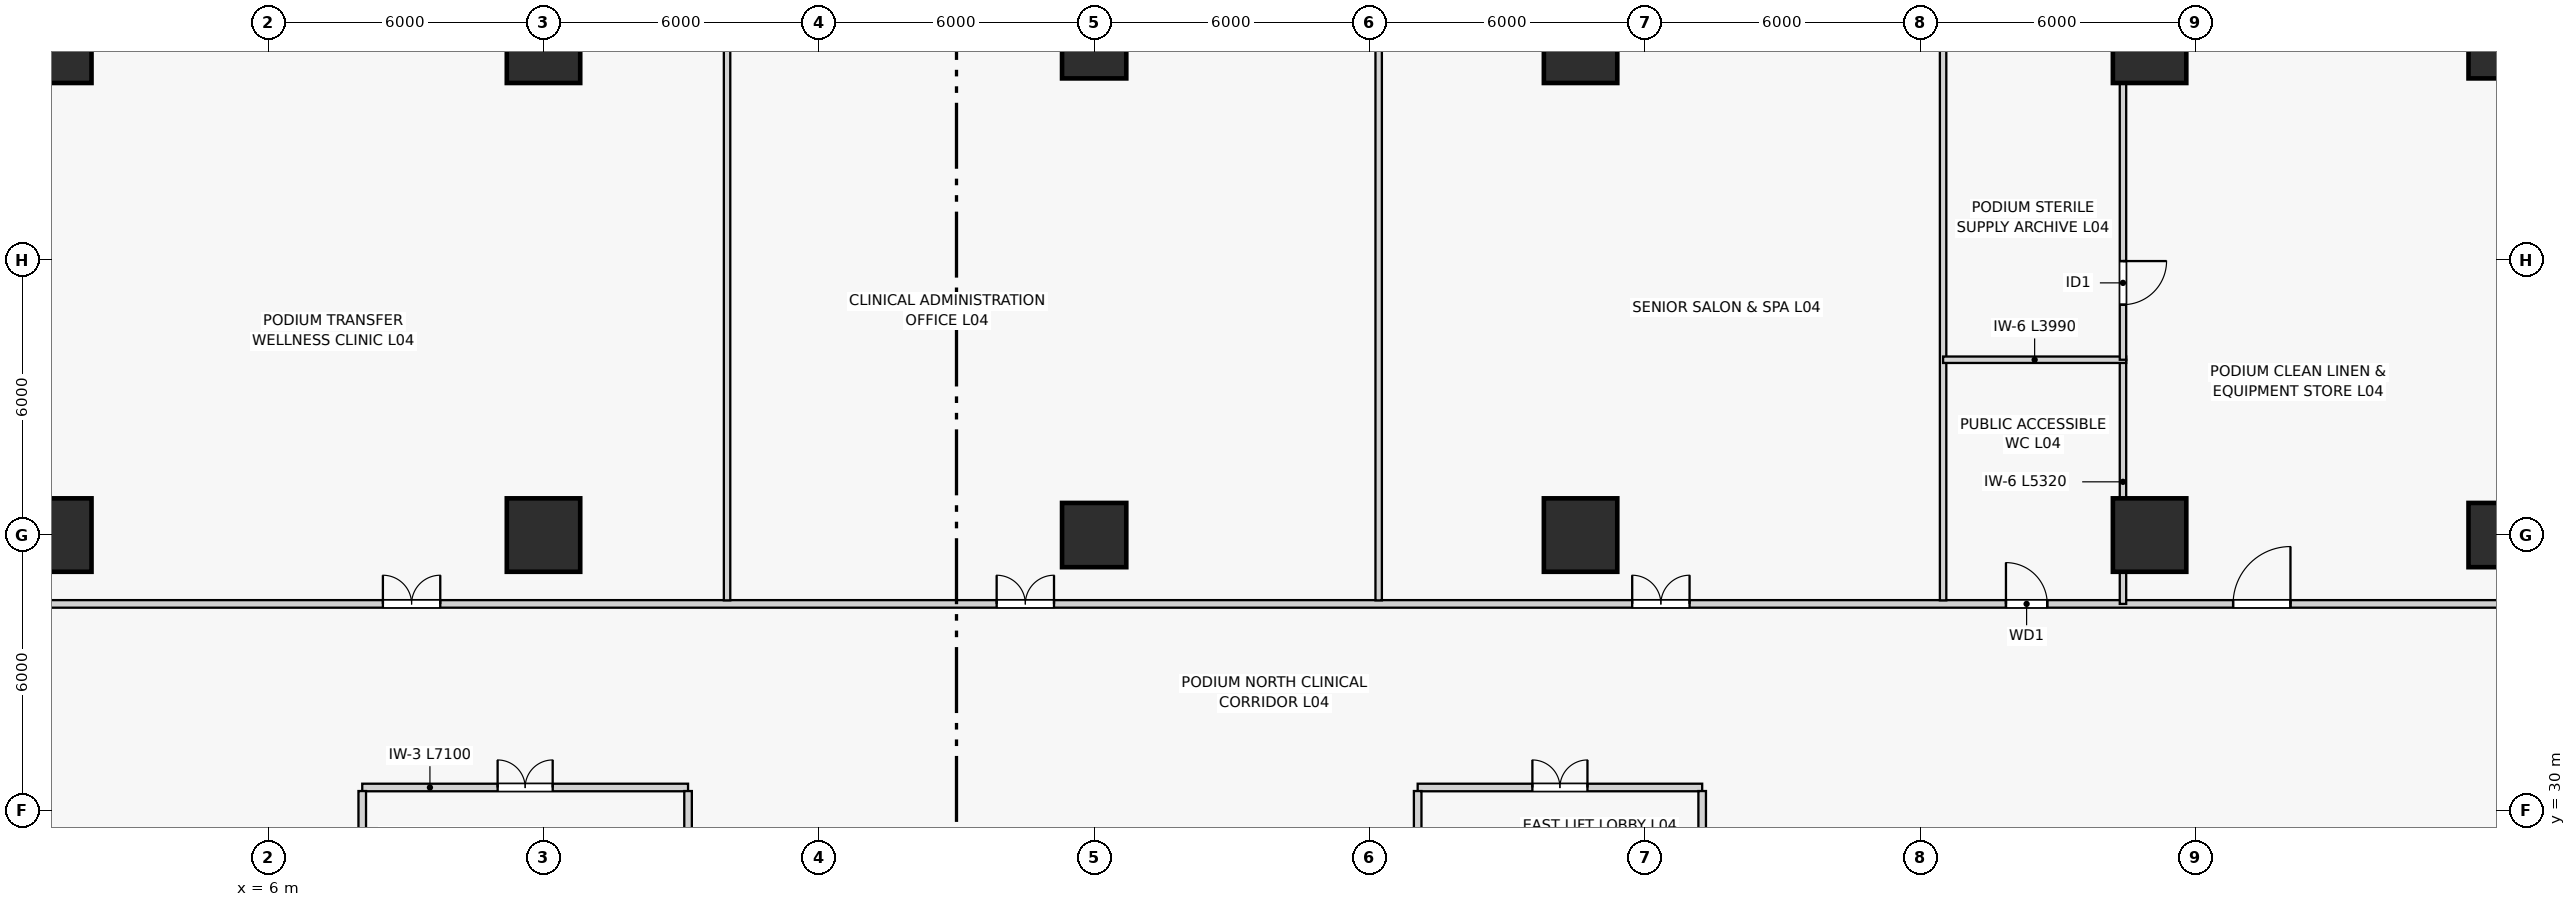
"""IFC4 building model, lengths in metres.
Left out: names, types, materials, properties, quantities, classifications, styles, units other than length and angle.
Written with IfcOpenShell. Run it as: python <this file> out.ifc"""

import sys

from ifc_helpers import new_model, si_unit, direction, frame, frame_2d, origin, origin_2d, place, context, subcontext, project, spatial, rectangle, extrude, source, transform, mapped, element, fill, save


model = new_model("IFC4")
c1 = context("Model", 3, precision=1e-05, world=origin(), true_north=direction((0.0, 1.0)))
c2 = subcontext(c1, "Body", "Model", "MODEL_VIEW")
j1 = project(units=[si_unit("LENGTHUNIT", "METRE"), si_unit("PLANEANGLEUNIT", "RADIAN")], contexts=[c1])
p1 = place(None, origin())
s1 = spatial("IfcSite", under=j1, at=p1, CompositionType="ELEMENT")
p2 = place(p1, origin())
s2 = spatial("IfcBuilding", under=s1, at=p2, CompositionType="ELEMENT")
p3 = place(p2, frame((0.0, 0.0, 18.0)))
s3 = spatial("IfcBuildingStorey", under=s2, at=p3, CompositionType="ELEMENT", Elevation=18.0)
m1 = source(origin(), c2, "Body", "SweptSolid", [
    extrude(rectangle(XDim=1.6, YDim=1.6, at=origin_2d()), origin(), (0.0, 0.0, 1.0), 4.5),
])
for number, where, z_axis, x_axis in (
    (1, (1.35, 36.0, 0.0), (0.0, 0.0, 1.0), (1.0, 0.0, 0.0)),
    (2, (1.35, 46.65, 0.0), (0.0, 0.0, 1.0), (1.0, 0.0, 0.0)),
    (3, (12.0, 36.0, 0.0), (0.0, 0.0, 1.0), (1.0, 0.0, 0.0)),
    (4, (12.0, 46.65, 0.0), (0.0, 0.0, 1.0), (1.0, 0.0, 0.0)),
):
    element("IfcColumn", number, at=place(p3, frame(where, z_axis=z_axis, x_axis=x_axis)), inside=s3, PredefinedType="COLUMN", context=c2, shape_type="MappedRepresentation", body=[
        mapped(m1, transform((0.0, 0.0, 0.0), scale=1.0)),
    ])
m2 = source(origin(), c2, "Body", "SweptSolid", [
    extrude(rectangle(XDim=1.4, YDim=1.4, at=origin_2d()), origin(), (0.0, 0.0, 1.0), 4.5),
])
for number, where, z_axis, x_axis in (
    (5, (24.0, 36.0, 0.0), (0.0, 0.0, 1.0), (1.0, 0.0, 0.0)),
    (6, (24.0, 46.65, 0.0), (0.0, 0.0, 1.0), (1.0, 0.0, 0.0)),
):
    element("IfcColumn", number, at=place(p3, frame(where, z_axis=z_axis, x_axis=x_axis)), inside=s3, PredefinedType="COLUMN", context=c2, shape_type="MappedRepresentation", body=[
        mapped(m2, transform((0.0, 0.0, 0.0), scale=1.0)),
    ])
for number, where, z_axis, x_axis in (
    (7, (34.6, 36.0, 0.0), (0.0, 0.0, 1.0), (1.0, 0.0, 0.0)),
    (8, (34.6, 46.65, 0.0), (0.0, 0.0, 1.0), (1.0, 0.0, 0.0)),
    (9, (47.0, 36.0, 0.0), (0.0, 0.0, 1.0), (1.0, 0.0, 0.0)),
    (10, (47.0, 46.65, 0.0), (0.0, 0.0, 1.0), (1.0, 0.0, 0.0)),
):
    element("IfcColumn", number, at=place(p3, frame(where, z_axis=z_axis, x_axis=x_axis)), inside=s3, PredefinedType="COLUMN", context=c2, shape_type="MappedRepresentation", body=[
        mapped(m1, transform((0.0, 0.0, 0.0), scale=1.0)),
    ])
for number, where, z_axis, x_axis in (
    (11, (54.65, 36.0, 0.0), (0.0, 0.0, 1.0), (1.0, 0.0, 0.0)),
    (12, (54.65, 46.65, 0.0), (0.0, 0.0, 1.0), (1.0, 0.0, 0.0)),
):
    element("IfcColumn", number, at=place(p3, frame(where, z_axis=z_axis, x_axis=x_axis)), inside=s3, PredefinedType="COLUMN", context=c2, shape_type="MappedRepresentation", body=[
        mapped(m2, transform((0.0, 0.0, 0.0), scale=1.0)),
    ])
p4 = place(p3, frame((8.05, 30.5, 0.0), z_axis=(0.0, 0.0, 1.0), x_axis=(1.0, 0.0, 0.0)))
e13 = element("IfcWall", 13, at=p4, inside=s3, PredefinedType="PARTITIONING", context=c2, shape_type="SweptSolid", body=[
    extrude(rectangle(XDim=7.1, YDim=0.165, at=frame_2d((3.55, 0.0))), origin(), (0.0, 0.0, 1.0), 3.85),
])
p5 = place(p4, frame((2.95, 0.0, 0.0)))
e14 = element("IfcOpeningElement", 14, at=p5, cuts=e13, PredefinedType="OPENING", context=c2, shape_type="SweptSolid", body=[
    extrude(rectangle(XDim=1.2, YDim=2.2, at=frame_2d((0.6, 1.1))), frame((0.0, 0.093, 0.0), z_axis=(0.0, -1.0, 0.0), x_axis=(1.0, 0.0, 0.0)), (0.0, 0.0, 1.0), 0.185),
])
for number, where, z_axis, x_axis in (
    (15, (8.05, 27.62, 0.0), (0.0, 0.0, 1.0), (0.0, 1.0, 0.0)),
    (16, (15.15, 27.62, 0.0), (0.0, 0.0, 1.0), (0.0, 1.0, 0.0)),
):
    element("IfcWall", number, at=place(p3, frame(where, z_axis=z_axis, x_axis=x_axis)), inside=s3, PredefinedType="PARTITIONING", context=c2, shape_type="SweptSolid", body=[
        extrude(rectangle(XDim=2.802, YDim=0.165, at=frame_2d((1.401, 0.0))), origin(), (0.0, 0.0, 1.0), 3.85),
    ])
p6 = place(p3, frame((31.05, 30.5, 0.0), z_axis=(0.0, 0.0, 1.0), x_axis=(1.0, 0.0, 0.0)))
e17 = element("IfcWall", 17, at=p6, inside=s3, PredefinedType="PARTITIONING", context=c2, shape_type="SweptSolid", body=[
    extrude(rectangle(XDim=6.2, YDim=0.165, at=frame_2d((3.1, 0.0))), origin(), (0.0, 0.0, 1.0), 3.85),
])
p7 = place(p6, frame((2.5, 0.0, 0.0)))
e18 = element("IfcOpeningElement", 18, at=p7, cuts=e17, PredefinedType="OPENING", context=c2, shape_type="SweptSolid", body=[
    extrude(rectangle(XDim=1.2, YDim=2.2, at=frame_2d((0.6, 1.1))), frame((0.0, 0.093, 0.0), z_axis=(0.0, -1.0, 0.0), x_axis=(1.0, 0.0, 0.0)), (0.0, 0.0, 1.0), 0.185),
])
p8 = place(p3, frame((31.05, 27.62, 0.0), z_axis=(0.0, 0.0, 1.0), x_axis=(0.0, 1.0, 0.0)))
e19 = element("IfcWall", 19, at=p8, inside=s3, PredefinedType="PARTITIONING", context=c2, shape_type="SweptSolid", body=[
    extrude(rectangle(XDim=2.802, YDim=0.165, at=frame_2d((1.401, 0.0))), origin(), (0.0, 0.0, 1.0), 2.52),
])
p9 = place(p3, frame((37.25, 27.62, 0.0), z_axis=(0.0, 0.0, 1.0), x_axis=(0.0, 1.0, 0.0)))
e20 = element("IfcWall", 20, at=p9, inside=s3, PredefinedType="PARTITIONING", context=c2, shape_type="SweptSolid", body=[
    extrude(rectangle(XDim=2.802, YDim=0.165, at=frame_2d((1.401, 0.0))), origin(), (0.0, 0.0, 1.0), 3.85),
])
p10 = place(p3, frame((0.185, 34.5, 0.0), z_axis=(0.0, 0.0, 1.0), x_axis=(1.0, 0.0, 0.0)))
e21 = element("IfcWall", 21, at=p10, inside=s3, PredefinedType="PARTITIONING", context=c2, shape_type="SweptSolid", body=[
    extrude(rectangle(XDim=55.63, YDim=0.165, at=frame_2d((27.815, 0.0))), origin(), (0.0, 0.0, 1.0), 3.85),
])
p11 = place(p10, frame((8.315, 0.0, 0.0)))
e22 = element("IfcOpeningElement", 22, at=p11, cuts=e21, PredefinedType="OPENING", context=c2, shape_type="SweptSolid", body=[
    extrude(rectangle(XDim=1.25, YDim=2.2, at=frame_2d((0.625, 1.1))), frame((0.0, 0.093, 0.0), z_axis=(0.0, -1.0, 0.0), x_axis=(1.0, 0.0, 0.0)), (0.0, 0.0, 1.0), 0.185),
])
p12 = place(p10, frame((21.69, 0.0, 0.0)))
e23 = element("IfcOpeningElement", 23, at=p12, cuts=e21, PredefinedType="OPENING", context=c2, shape_type="SweptSolid", body=[
    extrude(rectangle(XDim=1.25, YDim=2.2, at=frame_2d((0.625, 1.1))), frame((0.0, 0.093, 0.0), z_axis=(0.0, -1.0, 0.0), x_axis=(1.0, 0.0, 0.0)), (0.0, 0.0, 1.0), 0.185),
])
p13 = place(p10, frame((35.54, 0.0, 0.0)))
e24 = element("IfcOpeningElement", 24, at=p13, cuts=e21, PredefinedType="OPENING", context=c2, shape_type="SweptSolid", body=[
    extrude(rectangle(XDim=1.25, YDim=2.2, at=frame_2d((0.625, 1.1))), frame((0.0, 0.093, 0.0), z_axis=(0.0, -1.0, 0.0), x_axis=(1.0, 0.0, 0.0)), (0.0, 0.0, 1.0), 0.185),
])
p14 = place(p10, frame((43.685, 0.0, 0.0)))
e25 = element("IfcOpeningElement", 25, at=p14, cuts=e21, PredefinedType="OPENING", context=c2, shape_type="SweptSolid", body=[
    extrude(rectangle(XDim=0.9, YDim=2.1, at=frame_2d((0.45, 1.05))), frame((0.0, 0.093, 0.0), z_axis=(0.0, -1.0, 0.0), x_axis=(1.0, 0.0, 0.0)), (0.0, 0.0, 1.0), 0.185),
])
p15 = place(p10, frame((48.635, 0.0, 0.0)))
e26 = element("IfcOpeningElement", 26, at=p15, cuts=e21, PredefinedType="OPENING", context=c2, shape_type="SweptSolid", body=[
    extrude(rectangle(XDim=1.25, YDim=2.2, at=frame_2d((0.625, 1.1))), frame((0.0, 0.093, 0.0), z_axis=(0.0, -1.0, 0.0), x_axis=(1.0, 0.0, 0.0)), (0.0, 0.0, 1.0), 0.185),
])
p16 = place(p3, frame((16.0, 34.577, 0.0), z_axis=(0.0, 0.0, 1.0), x_axis=(0.0, 1.0, 0.0)))
e27 = element("IfcWall", 27, at=p16, inside=s3, PredefinedType="PARTITIONING", context=c2, shape_type="SweptSolid", body=[
    extrude(rectangle(XDim=13.238, YDim=0.14, at=frame_2d((6.619, 0.0))), origin(), (0.0, 0.0, 1.0), 3.85),
])
p17 = place(p3, frame((30.2, 34.577, 0.0), z_axis=(0.0, 0.0, 1.0), x_axis=(0.0, 1.0, 0.0)))
e28 = element("IfcWall", 28, at=p17, inside=s3, PredefinedType="PARTITIONING", context=c2, shape_type="SweptSolid", body=[
    extrude(rectangle(XDim=13.238, YDim=0.14, at=frame_2d((6.619, 0.0))), origin(), (0.0, 0.0, 1.0), 2.52),
])
p18 = place(p3, frame((42.5, 34.577, 0.0), z_axis=(0.0, 0.0, 1.0), x_axis=(0.0, 1.0, 0.0)))
e29 = element("IfcWall", 29, at=p18, inside=s3, PredefinedType="PARTITIONING", context=c2, shape_type="SweptSolid", body=[
    extrude(rectangle(XDim=13.238, YDim=0.14, at=frame_2d((6.619, 0.0))), origin(), (0.0, 0.0, 1.0), 3.85),
])
p19 = place(p3, frame((46.42, 34.5, 0.0), z_axis=(0.0, 0.0, 1.0), x_axis=(0.0, 1.0, 0.0)))
e30 = element("IfcWall", 30, at=p19, inside=s3, PredefinedType="PLUMBINGWALL", context=c2, shape_type="SweptSolid", body=[
    extrude(rectangle(XDim=5.32, YDim=0.14, at=frame_2d((2.66, 0.0))), origin(), (0.0, 0.0, 1.0), 2.72),
])
p20 = place(p3, frame((42.5, 39.82, 0.0), z_axis=(0.0, 0.0, 1.0), x_axis=(1.0, 0.0, 0.0)))
e31 = element("IfcWall", 31, at=p20, inside=s3, PredefinedType="PLUMBINGWALL", context=c2, shape_type="SweptSolid", body=[
    extrude(rectangle(XDim=3.99, YDim=0.14, at=frame_2d((1.995, 0.0))), origin(), (0.0, 0.0, 1.0), 3.85),
])
p21 = place(p3, frame((46.42, 39.82, 0.0), z_axis=(0.0, 0.0, 1.0), x_axis=(0.0, 1.0, 0.0)))
e32 = element("IfcWall", 32, at=p21, inside=s3, PredefinedType="PARTITIONING", context=c2, shape_type="SweptSolid", body=[
    extrude(rectangle(XDim=7.995, YDim=0.14, at=frame_2d((3.998, 0.0))), origin(), (0.0, 0.0, 1.0), 2.72),
])
p22 = place(p21, frame((1.2, 0.0, 0.0)))
e33 = element("IfcOpeningElement", 33, at=p22, cuts=e32, PredefinedType="OPENING", context=c2, shape_type="SweptSolid", body=[
    extrude(rectangle(XDim=0.95, YDim=2.1, at=frame_2d((0.475, 1.05))), frame((0.0, 0.08, 0.0), z_axis=(0.0, -1.0, 0.0), x_axis=(1.0, 0.0, 0.0)), (0.0, 0.0, 1.0), 0.16),
])
m3 = source(origin(), c2, "Body", "SweptSolid", [
    extrude(rectangle(XDim=1.2, YDim=2.2, at=frame_2d((0.6, 1.1))), frame((0.0, 0.025, 0.0), z_axis=(0.0, -1.0, 0.0), x_axis=(1.0, 0.0, 0.0)), (0.0, 0.0, 1.0), 0.05),
])
p23 = place(p5, origin())
e34 = element("IfcDoor", 34, at=p23, inside=s3, OperationType="DOUBLE_DOOR_SINGLE_SWING", PredefinedType="DOOR", context=c2, shape_type="MappedRepresentation", body=[
    mapped(m3, transform((0.0, 0.0, 0.0), scale=1.0)),
])
fill(e14, e34)
p24 = place(p7, origin())
e35 = element("IfcDoor", 35, at=p24, inside=s3, OperationType="DOUBLE_DOOR_SINGLE_SWING", PredefinedType="DOOR", context=c2, shape_type="MappedRepresentation", body=[
    mapped(m3, transform((0.0, 0.0, 0.0), scale=1.0)),
])
fill(e18, e35)
m4 = source(origin(), c2, "Body", "SweptSolid", [
    extrude(rectangle(XDim=1.25, YDim=2.2, at=frame_2d((0.625, 1.1))), frame((0.0, 0.025, 0.0), z_axis=(0.0, -1.0, 0.0), x_axis=(1.0, 0.0, 0.0)), (0.0, 0.0, 1.0), 0.05),
])
p25 = place(p11, origin())
e36 = element("IfcDoor", 36, at=p25, inside=s3, OperationType="DOUBLE_DOOR_SINGLE_SWING", PredefinedType="DOOR", context=c2, shape_type="MappedRepresentation", body=[
    mapped(m4, transform((0.0, 0.0, 0.0), scale=1.0)),
])
fill(e22, e36)
p26 = place(p12, origin())
e37 = element("IfcDoor", 37, at=p26, inside=s3, OperationType="DOUBLE_DOOR_SINGLE_SWING", PredefinedType="DOOR", context=c2, shape_type="MappedRepresentation", body=[
    mapped(m4, transform((0.0, 0.0, 0.0), scale=1.0)),
])
fill(e23, e37)
p27 = place(p13, origin())
e38 = element("IfcDoor", 38, at=p27, inside=s3, OperationType="DOUBLE_DOOR_SINGLE_SWING", PredefinedType="DOOR", context=c2, shape_type="MappedRepresentation", body=[
    mapped(m4, transform((0.0, 0.0, 0.0), scale=1.0)),
])
fill(e24, e38)
m5 = source(origin(), c2, "Body", "SweptSolid", [
    extrude(rectangle(XDim=0.9, YDim=2.1, at=frame_2d((0.45, 1.05))), frame((0.0, 0.025, 0.0), z_axis=(0.0, -1.0, 0.0), x_axis=(1.0, 0.0, 0.0)), (0.0, 0.0, 1.0), 0.05),
])
p28 = place(p14, origin())
e39 = element("IfcDoor", 39, at=p28, inside=s3, OperationType="SINGLE_SWING_LEFT", PredefinedType="DOOR", context=c2, shape_type="MappedRepresentation", body=[
    mapped(m5, transform((0.0, 0.0, 0.0), scale=1.0)),
])
fill(e25, e39)
p29 = place(p15, origin())
e40 = element("IfcDoor", 40, at=p29, inside=s3, OperationType="SINGLE_SWING_RIGHT", PredefinedType="DOOR", context=c2, shape_type="MappedRepresentation", body=[
    mapped(m4, transform((0.0, 0.0, 0.0), scale=1.0)),
])
fill(e26, e40)
m6 = source(origin(), c2, "Body", "SweptSolid", [
    extrude(rectangle(XDim=0.95, YDim=2.1, at=frame_2d((0.475, 1.05))), frame((0.0, 0.025, 0.0), z_axis=(0.0, -1.0, 0.0), x_axis=(1.0, 0.0, 0.0)), (0.0, 0.0, 1.0), 0.05),
])
p30 = place(p22, frame((0.95, 0.0, 0.0), z_axis=(0.0, 0.0, 1.0), x_axis=(-1.0, 0.0, 0.0)))
e41 = element("IfcDoor", 41, at=p30, inside=s3, OperationType="SINGLE_SWING_LEFT", PredefinedType="DOOR", context=c2, shape_type="MappedRepresentation", body=[
    mapped(m6, transform((0.0, 0.0, 0.0), scale=1.0)),
])
fill(e33, e41)
save(model, sys.argv[1])
